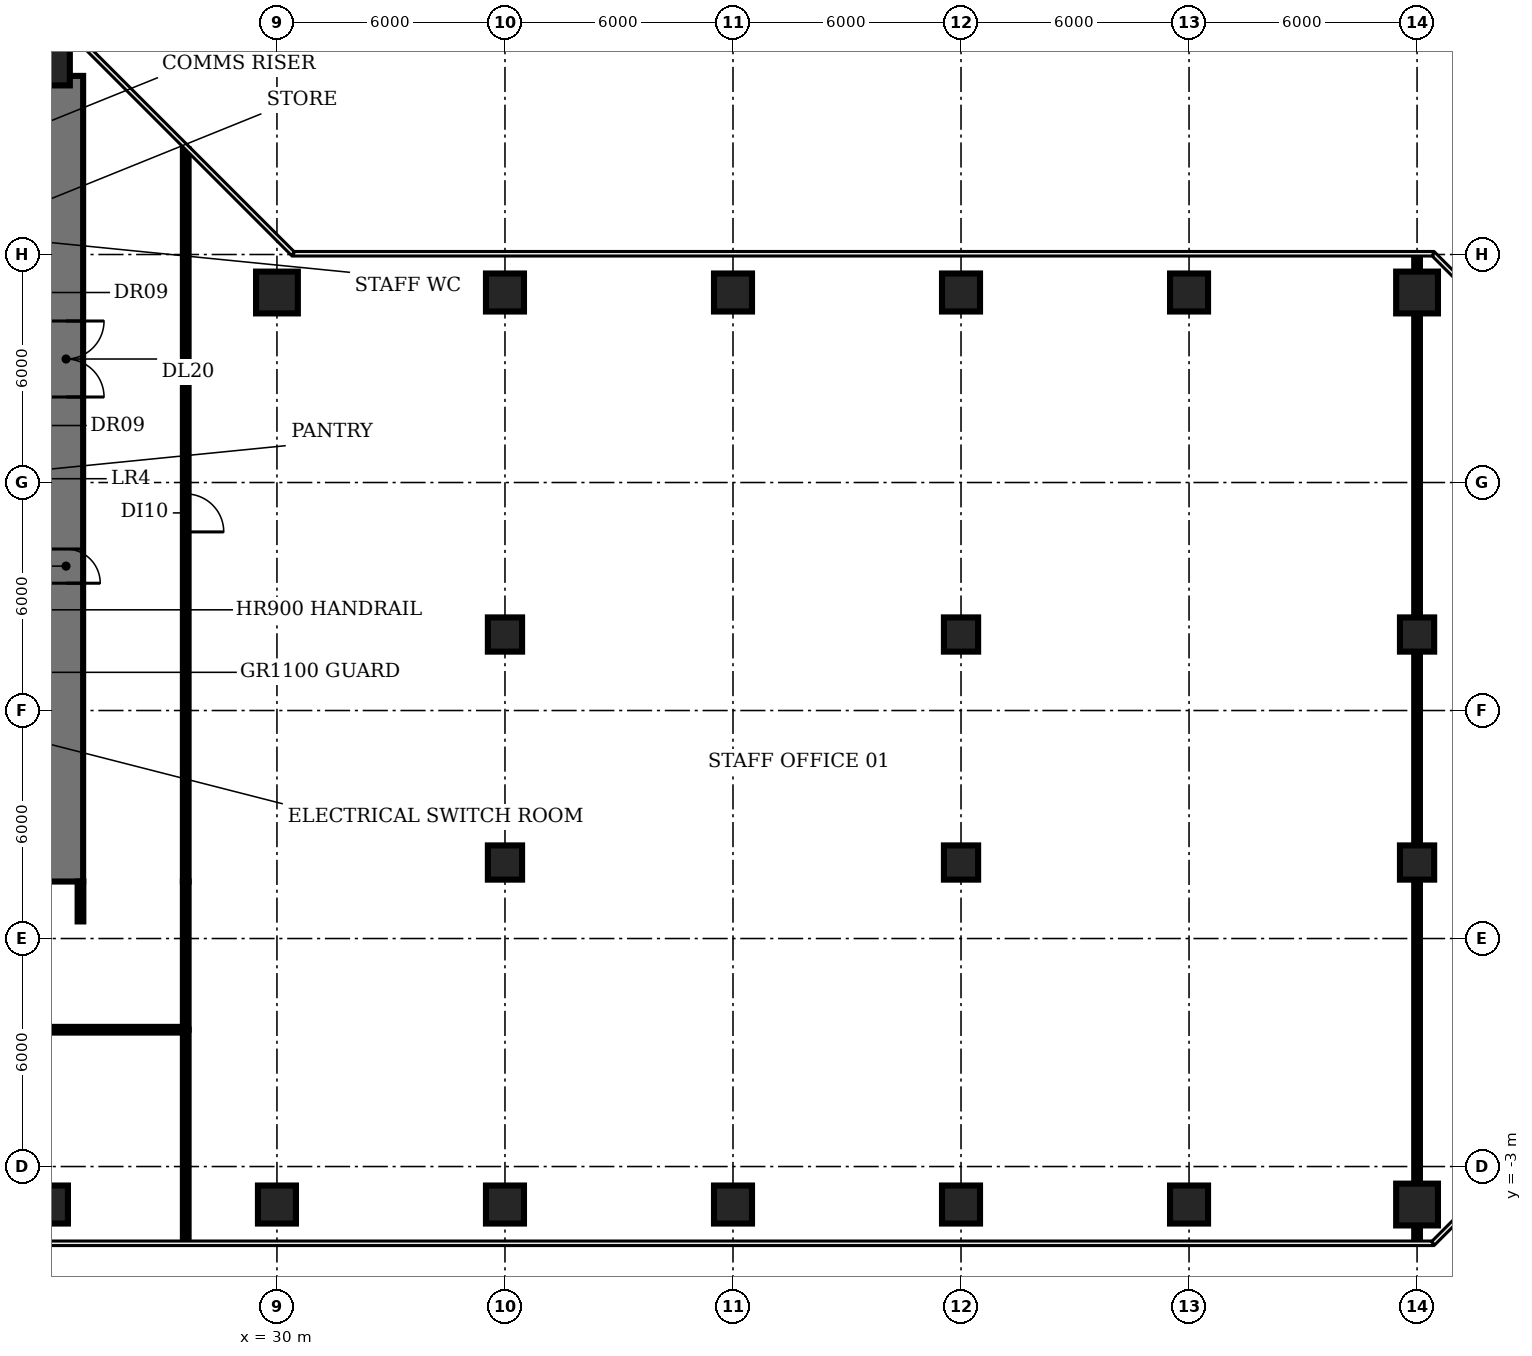
"""IFC4 building model, lengths in metres.
Left out: names, types, materials, properties, quantities, classifications, styles, units other than length and angle.
Written with IfcOpenShell. Run it as: python <this file> out.ifc"""

import sys

from ifc_helpers import new_model, si_unit, direction, frame, frame_2d, origin, origin_2d, place, context, subcontext, project, spatial, rectangle, circle, extrude, element, fill, save


model = new_model("IFC4")
c1 = context("Model", 3, precision=1e-05, world=origin(), true_north=direction((0.0, 1.0)))
c2 = subcontext(c1, "Body", "Model", "MODEL_VIEW")
j1 = project(units=[si_unit("LENGTHUNIT", "METRE"), si_unit("PLANEANGLEUNIT", "RADIAN")], contexts=[c1])
p1 = place(None, origin())
s1 = spatial("IfcSite", under=j1, at=p1, CompositionType="ELEMENT")
p2 = place(p1, origin())
s2 = spatial("IfcBuilding", under=s1, at=p2, CompositionType="ELEMENT")
p3 = place(p2, frame((0.0, 0.0, 24.5)))
s3 = spatial("IfcBuildingStorey", under=s2, at=p3, CompositionType="ELEMENT", Elevation=24.5)
p4 = place(p3, frame((24.0, -4.0, 0.0), z_axis=(0.0, 0.0, 1.0), x_axis=(1.0, 0.0, 0.0)))
e1 = element("IfcColumn", 1, at=p4, inside=s3, PredefinedType="COLUMN", context=c2, shape_type="SweptSolid", body=[
    extrude(rectangle(XDim=1.0, YDim=1.0, at=origin_2d()), origin(), (0.0, 0.0, 1.0), 4.15),
])
p5 = place(p3, frame((24.0, 26.0, 0.0), z_axis=(0.0, 0.0, 1.0), x_axis=(1.0, 0.0, 0.0)))
e2 = element("IfcColumn", 2, at=p5, inside=s3, PredefinedType="COLUMN", context=c2, shape_type="SweptSolid", body=[
    extrude(circle(Radius=0.55, at=origin_2d()), origin(), (0.0, 0.0, 1.0), 4.15),
])
p6 = place(p3, frame((30.0, -4.0, 0.0), z_axis=(0.0, 0.0, 1.0), x_axis=(1.0, 0.0, 0.0)))
e3 = element("IfcColumn", 3, at=p6, inside=s3, PredefinedType="COLUMN", context=c2, shape_type="SweptSolid", body=[
    extrude(rectangle(XDim=1.0, YDim=1.0, at=origin_2d()), origin(), (0.0, 0.0, 1.0), 4.15),
])
p7 = place(p3, frame((30.0, 20.0, 0.0), z_axis=(0.0, 0.0, 1.0), x_axis=(1.0, 0.0, 0.0)))
e4 = element("IfcColumn", 4, at=p7, inside=s3, PredefinedType="COLUMN", context=c2, shape_type="SweptSolid", body=[
    extrude(circle(Radius=0.55, at=origin_2d()), origin(), (0.0, 0.0, 1.0), 4.15),
])
p8 = place(p3, frame((36.0, -4.0, 0.0), z_axis=(0.0, 0.0, 1.0), x_axis=(1.0, 0.0, 0.0)))
e5 = element("IfcColumn", 5, at=p8, inside=s3, PredefinedType="COLUMN", context=c2, shape_type="SweptSolid", body=[
    extrude(rectangle(XDim=1.0, YDim=1.0, at=origin_2d()), origin(), (0.0, 0.0, 1.0), 4.15),
])
for number, where, z_axis, x_axis in (
    (6, (36.0, 5.0, 0.0), (0.0, 0.0, 1.0), (1.0, 0.0, 0.0)),
    (7, (36.0, 11.0, 0.0), (0.0, 0.0, 1.0), (1.0, 0.0, 0.0)),
):
    element("IfcColumn", number, at=place(p3, frame(where, z_axis=z_axis, x_axis=x_axis)), inside=s3, PredefinedType="COLUMN", context=c2, shape_type="SweptSolid", body=[
        extrude(rectangle(XDim=0.9, YDim=0.9, at=origin_2d()), origin(), (0.0, 0.0, 1.0), 4.15),
    ])
for number, where, z_axis, x_axis in (
    (8, (36.0, 20.0, 0.0), (0.0, 0.0, 1.0), (1.0, 0.0, 0.0)),
    (9, (42.0, -4.0, 0.0), (0.0, 0.0, 1.0), (1.0, 0.0, 0.0)),
    (10, (42.0, 20.0, 0.0), (0.0, 0.0, 1.0), (1.0, 0.0, 0.0)),
    (11, (48.0, -4.0, 0.0), (0.0, 0.0, 1.0), (1.0, 0.0, 0.0)),
):
    element("IfcColumn", number, at=place(p3, frame(where, z_axis=z_axis, x_axis=x_axis)), inside=s3, PredefinedType="COLUMN", context=c2, shape_type="SweptSolid", body=[
        extrude(rectangle(XDim=1.0, YDim=1.0, at=origin_2d()), origin(), (0.0, 0.0, 1.0), 4.15),
    ])
for number, where, z_axis, x_axis in (
    (12, (48.0, 5.0, 0.0), (0.0, 0.0, 1.0), (1.0, 0.0, 0.0)),
    (13, (48.0, 11.0, 0.0), (0.0, 0.0, 1.0), (1.0, 0.0, 0.0)),
):
    element("IfcColumn", number, at=place(p3, frame(where, z_axis=z_axis, x_axis=x_axis)), inside=s3, PredefinedType="COLUMN", context=c2, shape_type="SweptSolid", body=[
        extrude(rectangle(XDim=0.9, YDim=0.9, at=origin_2d()), origin(), (0.0, 0.0, 1.0), 4.15),
    ])
for number, where, z_axis, x_axis in (
    (14, (48.0, 20.0, 0.0), (0.0, 0.0, 1.0), (1.0, 0.0, 0.0)),
    (15, (54.0, -4.0, 0.0), (0.0, 0.0, 1.0), (1.0, 0.0, 0.0)),
    (16, (54.0, 20.0, 0.0), (0.0, 0.0, 1.0), (1.0, 0.0, 0.0)),
):
    element("IfcColumn", number, at=place(p3, frame(where, z_axis=z_axis, x_axis=x_axis)), inside=s3, PredefinedType="COLUMN", context=c2, shape_type="SweptSolid", body=[
        extrude(rectangle(XDim=1.0, YDim=1.0, at=origin_2d()), origin(), (0.0, 0.0, 1.0), 4.15),
    ])
p9 = place(p3, frame((60.0, -4.0, 0.0), z_axis=(0.0, 0.0, 1.0), x_axis=(1.0, 0.0, 0.0)))
e17 = element("IfcColumn", 17, at=p9, inside=s3, PredefinedType="COLUMN", context=c2, shape_type="SweptSolid", body=[
    extrude(circle(Radius=0.55, at=origin_2d()), origin(), (0.0, 0.0, 1.0), 4.15),
])
for number, where, z_axis, x_axis in (
    (18, (60.0, 5.0, 0.0), (0.0, 0.0, 1.0), (1.0, 0.0, 0.0)),
    (19, (60.0, 11.0, 0.0), (0.0, 0.0, 1.0), (1.0, 0.0, 0.0)),
):
    element("IfcColumn", number, at=place(p3, frame(where, z_axis=z_axis, x_axis=x_axis)), inside=s3, PredefinedType="COLUMN", context=c2, shape_type="SweptSolid", body=[
        extrude(rectangle(XDim=0.9, YDim=0.9, at=origin_2d()), origin(), (0.0, 0.0, 1.0), 4.15),
    ])
p10 = place(p3, frame((60.0, 20.0, 0.0), z_axis=(0.0, 0.0, 1.0), x_axis=(1.0, 0.0, 0.0)))
e20 = element("IfcColumn", 20, at=p10, inside=s3, PredefinedType="COLUMN", context=c2, shape_type="SweptSolid", body=[
    extrude(circle(Radius=0.55, at=origin_2d()), origin(), (0.0, 0.0, 1.0), 4.15),
])
p11 = place(p3, frame((24.45, 25.7, 0.0), z_axis=(0.0, 0.0, 1.0), x_axis=(0.0, -1.0, 0.0)))
e21 = element("IfcWall", 21, at=p11, inside=s3, PredefinedType="SHEAR", context=c2, shape_type="SweptSolid", body=[
    extrude(rectangle(XDim=21.2, YDim=0.9, at=frame_2d((10.6, 0.0))), origin(), (0.0, 0.0, 1.0), 4.15),
])
p12 = place(p11, frame((12.45, 0.0, 0.0)))
e22 = element("IfcOpeningElement", 22, at=p12, cuts=e21, PredefinedType="OPENING", context=c2, shape_type="SweptSolid", body=[
    extrude(rectangle(XDim=0.9, YDim=2.1, at=frame_2d((0.45, 1.05))), frame((0.0, 0.46, 0.0), z_axis=(0.0, -1.0, 0.0), x_axis=(1.0, 0.0, 0.0)), (0.0, 0.0, 1.0), 0.92),
])
p13 = place(p11, frame((6.45, 0.0, 0.0)))
e23 = element("IfcOpeningElement", 23, at=p13, cuts=e21, PredefinedType="OPENING", context=c2, shape_type="SweptSolid", body=[
    extrude(rectangle(XDim=2.0, YDim=2.1, at=frame_2d((1.0, 1.05))), frame((0.0, 0.46, 0.0), z_axis=(0.0, -1.0, 0.0), x_axis=(1.0, 0.0, 0.0)), (0.0, 0.0, 1.0), 0.92),
])
p14 = place(p3, frame((24.83, 3.45, 0.0), z_axis=(0.0, 0.0, 1.0), x_axis=(0.0, 1.0, 0.0)))
e24 = element("IfcWall", 24, at=p14, inside=s3, PredefinedType="PARTITIONING", context=c2, shape_type="SweptSolid", body=[
    extrude(rectangle(XDim=1.05, YDim=0.15, at=frame_2d((0.525, 0.0))), origin(), (0.0, 0.0, 1.0), 3.08),
])
p15 = place(p3, frame((27.6, -4.97, 0.0), z_axis=(0.0, 0.0, 1.0), x_axis=(0.0, 1.0, 0.0)))
e25 = element("IfcWall", 25, at=p15, inside=s3, PredefinedType="PARTITIONING", context=c2, shape_type="SweptSolid", body=[
    extrude(rectangle(XDim=5.57, YDim=0.15, at=frame_2d((2.785, 0.0))), origin(), (0.0, 0.0, 1.0), 3.08),
])
p16 = place(p3, frame((27.6, 0.6, 0.0), z_axis=(0.0, 0.0, 1.0), x_axis=(-1.0, 0.0, 0.0)))
e26 = element("IfcWall", 26, at=p16, inside=s3, PredefinedType="PARTITIONING", context=c2, shape_type="SweptSolid", body=[
    extrude(rectangle(XDim=25.2, YDim=0.15, at=frame_2d((12.6, 0.0))), origin(), (0.0, 0.0, 1.0), 3.08),
])
p17 = place(p16, frame((12.1, 0.0, 0.0)))
e27 = element("IfcOpeningElement", 27, at=p17, cuts=e26, PredefinedType="OPENING", context=c2, shape_type="SweptSolid", body=[
    extrude(rectangle(XDim=1.2, YDim=2.1, at=frame_2d((0.6, 1.05))), frame((0.0, 0.085, 0.0), z_axis=(0.0, -1.0, 0.0), x_axis=(1.0, 0.0, 0.0)), (0.0, 0.0, 1.0), 0.17),
])
p18 = place(p3, frame((27.6, 0.6, 0.0), z_axis=(0.0, 0.0, 1.0), x_axis=(0.0, 1.0, 0.0)))
e28 = element("IfcWall", 28, at=p18, inside=s3, PredefinedType="PARTITIONING", context=c2, shape_type="SweptSolid", body=[
    extrude(rectangle(XDim=3.9, YDim=0.15, at=frame_2d((1.95, 0.0))), origin(), (0.0, 0.0, 1.0), 3.08),
])
p19 = place(p3, frame((27.6, 23.77, 0.0), z_axis=(0.0, 0.0, 1.0), x_axis=(0.0, -1.0, 0.0)))
e29 = element("IfcWall", 29, at=p19, inside=s3, PredefinedType="PARTITIONING", context=c2, shape_type="SweptSolid", body=[
    extrude(rectangle(XDim=19.27, YDim=0.15, at=frame_2d((9.635, 0.0))), origin(), (0.0, 0.0, 1.0), 3.08),
])
p20 = place(p19, frame((9.07, 0.0, 0.0)))
e30 = element("IfcOpeningElement", 30, at=p20, cuts=e29, PredefinedType="OPENING", context=c2, shape_type="SweptSolid", body=[
    extrude(rectangle(XDim=1.0, YDim=2.1, at=frame_2d((0.5, 1.05))), frame((0.0, 0.085, 0.0), z_axis=(0.0, -1.0, 0.0), x_axis=(1.0, 0.0, 0.0)), (0.0, 0.0, 1.0), 0.17),
])
p21 = place(p3, frame((60.0, -4.97, 0.0), z_axis=(0.0, 0.0, 1.0), x_axis=(0.0, 1.0, 0.0)))
e31 = element("IfcWall", 31, at=p21, inside=s3, PredefinedType="PARTITIONING", context=c2, shape_type="SweptSolid", body=[
    extrude(rectangle(XDim=25.94, YDim=0.15, at=frame_2d((12.97, 0.0))), origin(), (0.0, 0.0, 1.0), 3.08),
])
p22 = place(p13, origin())
e32 = element("IfcDoor", 32, at=p22, inside=s3, OperationType="DOUBLE_DOOR_SINGLE_SWING", PredefinedType="DOOR", context=c2, shape_type="SweptSolid", body=[
    extrude(rectangle(XDim=2.0, YDim=2.1, at=frame_2d((1.0, 1.05))), frame((0.0, 0.025, 0.0), z_axis=(0.0, -1.0, 0.0), x_axis=(1.0, 0.0, 0.0)), (0.0, 0.0, 1.0), 0.05),
])
fill(e23, e32)
p23 = place(p20, origin())
e33 = element("IfcDoor", 33, at=p23, inside=s3, OperationType="SINGLE_SWING_RIGHT", PredefinedType="DOOR", context=c2, shape_type="SweptSolid", body=[
    extrude(rectangle(XDim=1.0, YDim=2.1, at=frame_2d((0.5, 1.05))), frame((0.0, 0.025, 0.0), z_axis=(0.0, -1.0, 0.0), x_axis=(1.0, 0.0, 0.0)), (0.0, 0.0, 1.0), 0.05),
])
fill(e30, e33)
save(model, sys.argv[1])
